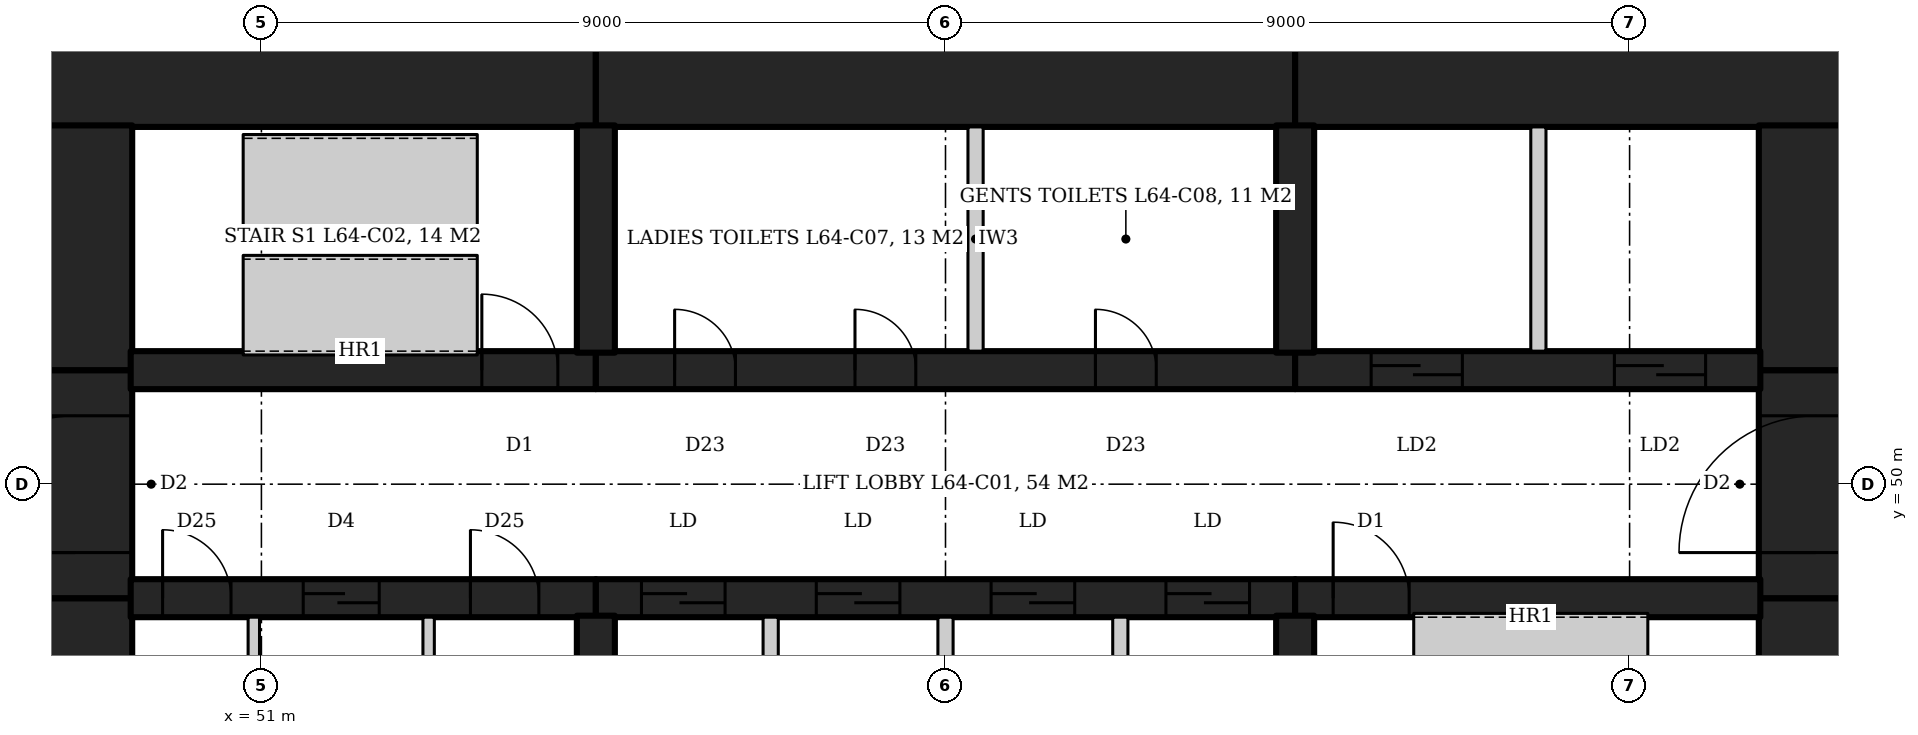
"""IFC4 building model, lengths in metres.
Left out: names, types, materials, properties, quantities, classifications, styles, units other than length and angle.
Written with IfcOpenShell. Run it as: python <this file> out.ifc"""

import sys

from ifc_helpers import new_model, si_unit, direction, frame, frame_2d, origin, place, context, subcontext, project, spatial, rectangle, extrude, element, fill, save


model = new_model("IFC4")
c1 = context("Model", 3, precision=1e-05, world=origin(), true_north=direction((0.0, 1.0)))
c2 = subcontext(c1, "Body", "Model", "MODEL_VIEW")
j1 = project(units=[si_unit("LENGTHUNIT", "METRE"), si_unit("PLANEANGLEUNIT", "RADIAN")], contexts=[c1])
p1 = place(None, origin())
s1 = spatial("IfcSite", under=j1, at=p1, CompositionType="ELEMENT")
p2 = place(p1, origin())
s2 = spatial("IfcBuilding", under=s1, at=p2, CompositionType="ELEMENT")
p3 = place(p2, frame((0.0, 0.0, 278.0)))
s3 = spatial("IfcBuildingStorey", under=s2, at=p3, CompositionType="ELEMENT", Elevation=278.0)
p4 = place(p3, frame((47.8, 55.45, 0.0), z_axis=(0.0, 0.0, 1.0), x_axis=(1.0, 0.0, 0.0)))
e1 = element("IfcWall", 1, at=p4, inside=s3, PredefinedType="SHEAR", context=c2, shape_type="SweptSolid", body=[
    extrude(rectangle(XDim=7.6, YDim=1.5, at=frame_2d((3.8, 0.0))), origin(), (0.0, 0.0, 1.0), 4.2),
])
p5 = place(p3, frame((55.4, 55.45, 0.0), z_axis=(0.0, 0.0, 1.0), x_axis=(1.0, 0.0, 0.0)))
e2 = element("IfcWall", 2, at=p5, inside=s3, PredefinedType="SHEAR", context=c2, shape_type="SweptSolid", body=[
    extrude(rectangle(XDim=9.2, YDim=1.5, at=frame_2d((4.6, 0.0))), origin(), (0.0, 0.0, 1.0), 4.2),
])
p6 = place(p3, frame((64.6, 55.45, 0.0), z_axis=(0.0, 0.0, 1.0), x_axis=(1.0, 0.0, 0.0)))
e3 = element("IfcWall", 3, at=p6, inside=s3, PredefinedType="SHEAR", context=c2, shape_type="SweptSolid", body=[
    extrude(rectangle(XDim=7.6, YDim=1.5, at=frame_2d((3.8, 0.0))), origin(), (0.0, 0.0, 1.0), 4.2),
])
p7 = place(p3, frame((71.45, 45.28, 0.0), z_axis=(0.0, 0.0, 1.0), x_axis=(0.0, 1.0, 0.0)))
e4 = element("IfcWall", 4, at=p7, inside=s3, PredefinedType="SHEAR", context=c2, shape_type="SweptSolid", body=[
    extrude(rectangle(XDim=3.22, YDim=1.5, at=frame_2d((1.61, 0.0))), origin(), (0.0, 0.0, 1.0), 4.2),
])
p8 = place(p3, frame((71.45, 48.5, 0.0), z_axis=(0.0, 0.0, 1.0), x_axis=(0.0, 1.0, 0.0)))
e5 = element("IfcWall", 5, at=p8, inside=s3, PredefinedType="SHEAR", context=c2, shape_type="SweptSolid", body=[
    extrude(rectangle(XDim=3.0, YDim=1.5, at=frame_2d((1.5, 0.0))), origin(), (0.0, 0.0, 1.0), 4.2),
])
p9 = place(p8, frame((0.6, 0.0, 0.0)))
e6 = element("IfcOpeningElement", 6, at=p9, cuts=e5, PredefinedType="OPENING", context=c2, shape_type="SweptSolid", body=[
    extrude(rectangle(XDim=1.8, YDim=2.1, at=frame_2d((0.9, 1.05))), frame((0.0, 0.76, 0.0), z_axis=(0.0, -1.0, 0.0), x_axis=(1.0, 0.0, 0.0)), (0.0, 0.0, 1.0), 1.52),
])
for number, where, z_axis, x_axis in (
    (7, (71.45, 51.5, 0.0), (0.0, 0.0, 1.0), (0.0, 1.0, 0.0)),
    (8, (48.55, 45.28, 0.0), (0.0, 0.0, 1.0), (0.0, 1.0, 0.0)),
):
    element("IfcWall", number, at=place(p3, frame(where, z_axis=z_axis, x_axis=x_axis)), inside=s3, PredefinedType="SHEAR", context=c2, shape_type="SweptSolid", body=[
        extrude(rectangle(XDim=3.22, YDim=1.5, at=frame_2d((1.61, 0.0))), origin(), (0.0, 0.0, 1.0), 4.2),
    ])
p10 = place(p3, frame((48.55, 48.5, 0.0), z_axis=(0.0, 0.0, 1.0), x_axis=(0.0, 1.0, 0.0)))
e9 = element("IfcWall", 9, at=p10, inside=s3, PredefinedType="SHEAR", context=c2, shape_type="SweptSolid", body=[
    extrude(rectangle(XDim=3.0, YDim=1.5, at=frame_2d((1.5, 0.0))), origin(), (0.0, 0.0, 1.0), 4.2),
])
p11 = place(p10, frame((0.6, 0.0, 0.0)))
e10 = element("IfcOpeningElement", 10, at=p11, cuts=e9, PredefinedType="OPENING", context=c2, shape_type="SweptSolid", body=[
    extrude(rectangle(XDim=1.8, YDim=2.1, at=frame_2d((0.9, 1.05))), frame((0.0, 0.76, 0.0), z_axis=(0.0, -1.0, 0.0), x_axis=(1.0, 0.0, 0.0)), (0.0, 0.0, 1.0), 1.52),
])
p12 = place(p3, frame((48.55, 51.5, 0.0), z_axis=(0.0, 0.0, 1.0), x_axis=(0.0, 1.0, 0.0)))
e11 = element("IfcWall", 11, at=p12, inside=s3, PredefinedType="SHEAR", context=c2, shape_type="SweptSolid", body=[
    extrude(rectangle(XDim=3.22, YDim=1.5, at=frame_2d((1.61, 0.0))), origin(), (0.0, 0.0, 1.0), 4.2),
])
p13 = place(p3, frame((49.28, 51.5, 0.0), z_axis=(0.0, 0.0, 1.0), x_axis=(1.0, 0.0, 0.0)))
e12 = element("IfcWall", 12, at=p13, inside=s3, PredefinedType="SHEAR", context=c2, shape_type="SweptSolid", body=[
    extrude(rectangle(XDim=6.12, YDim=0.5, at=frame_2d((3.06, 0.0))), origin(), (0.0, 0.0, 1.0), 4.2),
])
p14 = place(p13, frame((4.62, 0.0, 0.0)))
e13 = element("IfcOpeningElement", 13, at=p14, cuts=e12, PredefinedType="OPENING", context=c2, shape_type="SweptSolid", body=[
    extrude(rectangle(XDim=1.0, YDim=2.1, at=frame_2d((0.5, 1.05))), frame((0.0, 0.26, 0.0), z_axis=(0.0, -1.0, 0.0), x_axis=(1.0, 0.0, 0.0)), (0.0, 0.0, 1.0), 0.52),
])
p15 = place(p3, frame((55.4, 51.5, 0.0), z_axis=(0.0, 0.0, 1.0), x_axis=(1.0, 0.0, 0.0)))
e14 = element("IfcWall", 14, at=p15, inside=s3, PredefinedType="SHEAR", context=c2, shape_type="SweptSolid", body=[
    extrude(rectangle(XDim=9.2, YDim=0.5, at=frame_2d((4.6, 0.0))), origin(), (0.0, 0.0, 1.0), 4.2),
])
p16 = place(p15, frame((1.036, 0.0, 0.0)))
e15 = element("IfcOpeningElement", 15, at=p16, cuts=e14, PredefinedType="OPENING", context=c2, shape_type="SweptSolid", body=[
    extrude(rectangle(XDim=0.8, YDim=2.1, at=frame_2d((0.4, 1.05))), frame((0.0, 0.26, 0.0), z_axis=(0.0, -1.0, 0.0), x_axis=(1.0, 0.0, 0.0)), (0.0, 0.0, 1.0), 0.52),
])
p17 = place(p15, frame((3.409, 0.0, 0.0)))
e16 = element("IfcOpeningElement", 16, at=p17, cuts=e14, PredefinedType="OPENING", context=c2, shape_type="SweptSolid", body=[
    extrude(rectangle(XDim=0.8, YDim=2.1, at=frame_2d((0.4, 1.05))), frame((0.0, 0.26, 0.0), z_axis=(0.0, -1.0, 0.0), x_axis=(1.0, 0.0, 0.0)), (0.0, 0.0, 1.0), 0.52),
])
p18 = place(p15, frame((6.573, 0.0, 0.0)))
e17 = element("IfcOpeningElement", 17, at=p18, cuts=e14, PredefinedType="OPENING", context=c2, shape_type="SweptSolid", body=[
    extrude(rectangle(XDim=0.8, YDim=2.1, at=frame_2d((0.4, 1.05))), frame((0.0, 0.26, 0.0), z_axis=(0.0, -1.0, 0.0), x_axis=(1.0, 0.0, 0.0)), (0.0, 0.0, 1.0), 0.52),
])
p19 = place(p3, frame((64.6, 51.5, 0.0), z_axis=(0.0, 0.0, 1.0), x_axis=(1.0, 0.0, 0.0)))
e18 = element("IfcWall", 18, at=p19, inside=s3, PredefinedType="SHEAR", context=c2, shape_type="SweptSolid", body=[
    extrude(rectangle(XDim=6.12, YDim=0.5, at=frame_2d((3.06, 0.0))), origin(), (0.0, 0.0, 1.0), 4.2),
])
p20 = place(p19, frame((1.0, 0.0, 0.0)))
e19 = element("IfcOpeningElement", 19, at=p20, cuts=e18, PredefinedType="OPENING", context=c2, shape_type="SweptSolid", body=[
    extrude(rectangle(XDim=1.2, YDim=2.1, at=frame_2d((0.6, 1.05))), frame((0.0, 0.26, 0.0), z_axis=(0.0, -1.0, 0.0), x_axis=(1.0, 0.0, 0.0)), (0.0, 0.0, 1.0), 0.52),
])
p21 = place(p19, frame((4.2, 0.0, 0.0)))
e20 = element("IfcOpeningElement", 20, at=p21, cuts=e18, PredefinedType="OPENING", context=c2, shape_type="SweptSolid", body=[
    extrude(rectangle(XDim=1.2, YDim=2.1, at=frame_2d((0.6, 1.05))), frame((0.0, 0.26, 0.0), z_axis=(0.0, -1.0, 0.0), x_axis=(1.0, 0.0, 0.0)), (0.0, 0.0, 1.0), 0.52),
])
p22 = place(p3, frame((49.28, 48.5, 0.0), z_axis=(0.0, 0.0, 1.0), x_axis=(1.0, 0.0, 0.0)))
e21 = element("IfcWall", 21, at=p22, inside=s3, PredefinedType="SHEAR", context=c2, shape_type="SweptSolid", body=[
    extrude(rectangle(XDim=6.12, YDim=0.5, at=frame_2d((3.06, 0.0))), origin(), (0.0, 0.0, 1.0), 4.2),
])
p23 = place(p22, frame((0.42, 0.0, 0.0)))
e22 = element("IfcOpeningElement", 22, at=p23, cuts=e21, PredefinedType="OPENING", context=c2, shape_type="SweptSolid", body=[
    extrude(rectangle(XDim=0.9, YDim=2.1, at=frame_2d((0.45, 1.05))), frame((0.0, 0.26, 0.0), z_axis=(0.0, -1.0, 0.0), x_axis=(1.0, 0.0, 0.0)), (0.0, 0.0, 1.0), 0.52),
])
p24 = place(p22, frame((2.27, 0.0, 0.0)))
e23 = element("IfcOpeningElement", 23, at=p24, cuts=e21, PredefinedType="OPENING", context=c2, shape_type="SweptSolid", body=[
    extrude(rectangle(XDim=1.0, YDim=2.1, at=frame_2d((0.5, 1.05))), frame((0.0, 0.26, 0.0), z_axis=(0.0, -1.0, 0.0), x_axis=(1.0, 0.0, 0.0)), (0.0, 0.0, 1.0), 0.52),
])
p25 = place(p22, frame((4.47, 0.0, 0.0)))
e24 = element("IfcOpeningElement", 24, at=p25, cuts=e21, PredefinedType="OPENING", context=c2, shape_type="SweptSolid", body=[
    extrude(rectangle(XDim=0.9, YDim=2.1, at=frame_2d((0.45, 1.05))), frame((0.0, 0.26, 0.0), z_axis=(0.0, -1.0, 0.0), x_axis=(1.0, 0.0, 0.0)), (0.0, 0.0, 1.0), 0.52),
])
p26 = place(p3, frame((55.4, 48.5, 0.0), z_axis=(0.0, 0.0, 1.0), x_axis=(1.0, 0.0, 0.0)))
e25 = element("IfcWall", 25, at=p26, inside=s3, PredefinedType="SHEAR", context=c2, shape_type="SweptSolid", body=[
    extrude(rectangle(XDim=9.2, YDim=0.5, at=frame_2d((4.6, 0.0))), origin(), (0.0, 0.0, 1.0), 4.2),
])
p27 = place(p26, frame((0.6, 0.0, 0.0)))
e26 = element("IfcOpeningElement", 26, at=p27, cuts=e25, PredefinedType="OPENING", context=c2, shape_type="SweptSolid", body=[
    extrude(rectangle(XDim=1.1, YDim=2.1, at=frame_2d((0.55, 1.05))), frame((0.0, 0.26, 0.0), z_axis=(0.0, -1.0, 0.0), x_axis=(1.0, 0.0, 0.0)), (0.0, 0.0, 1.0), 0.52),
])
p28 = place(p26, frame((2.9, 0.0, 0.0)))
e27 = element("IfcOpeningElement", 27, at=p28, cuts=e25, PredefinedType="OPENING", context=c2, shape_type="SweptSolid", body=[
    extrude(rectangle(XDim=1.1, YDim=2.1, at=frame_2d((0.55, 1.05))), frame((0.0, 0.26, 0.0), z_axis=(0.0, -1.0, 0.0), x_axis=(1.0, 0.0, 0.0)), (0.0, 0.0, 1.0), 0.52),
])
p29 = place(p26, frame((5.2, 0.0, 0.0)))
e28 = element("IfcOpeningElement", 28, at=p29, cuts=e25, PredefinedType="OPENING", context=c2, shape_type="SweptSolid", body=[
    extrude(rectangle(XDim=1.1, YDim=2.1, at=frame_2d((0.55, 1.05))), frame((0.0, 0.26, 0.0), z_axis=(0.0, -1.0, 0.0), x_axis=(1.0, 0.0, 0.0)), (0.0, 0.0, 1.0), 0.52),
])
p30 = place(p26, frame((7.5, 0.0, 0.0)))
e29 = element("IfcOpeningElement", 29, at=p30, cuts=e25, PredefinedType="OPENING", context=c2, shape_type="SweptSolid", body=[
    extrude(rectangle(XDim=1.1, YDim=2.1, at=frame_2d((0.55, 1.05))), frame((0.0, 0.26, 0.0), z_axis=(0.0, -1.0, 0.0), x_axis=(1.0, 0.0, 0.0)), (0.0, 0.0, 1.0), 0.52),
])
p31 = place(p3, frame((64.6, 48.5, 0.0), z_axis=(0.0, 0.0, 1.0), x_axis=(1.0, 0.0, 0.0)))
e30 = element("IfcWall", 30, at=p31, inside=s3, PredefinedType="SHEAR", context=c2, shape_type="SweptSolid", body=[
    extrude(rectangle(XDim=6.12, YDim=0.5, at=frame_2d((3.06, 0.0))), origin(), (0.0, 0.0, 1.0), 4.2),
])
p32 = place(p31, frame((0.5, 0.0, 0.0)))
e31 = element("IfcOpeningElement", 31, at=p32, cuts=e30, PredefinedType="OPENING", context=c2, shape_type="SweptSolid", body=[
    extrude(rectangle(XDim=1.0, YDim=2.1, at=frame_2d((0.5, 1.05))), frame((0.0, 0.26, 0.0), z_axis=(0.0, -1.0, 0.0), x_axis=(1.0, 0.0, 0.0)), (0.0, 0.0, 1.0), 0.52),
])
for number, where, z_axis, x_axis in (
    (32, (55.4, 51.73, 0.0), (0.0, 0.0, 1.0), (0.0, 1.0, 0.0)),
    (33, (64.6, 51.73, 0.0), (0.0, 0.0, 1.0), (0.0, 1.0, 0.0)),
    (34, (55.4, 48.27, 0.0), (0.0, 0.0, 1.0), (0.0, -1.0, 0.0)),
    (35, (64.6, 48.27, 0.0), (0.0, 0.0, 1.0), (0.0, -1.0, 0.0)),
):
    element("IfcWall", number, at=place(p3, frame(where, z_axis=z_axis, x_axis=x_axis)), inside=s3, PredefinedType="SHEAR", context=c2, shape_type="SweptSolid", body=[
        extrude(rectangle(XDim=2.99, YDim=0.5, at=frame_2d((1.495, 0.0))), origin(), (0.0, 0.0, 1.0), 4.2),
    ])
for number, where, z_axis, x_axis in (
    (36, (57.7, 45.3, 0.0), (0.0, 0.0, 1.0), (0.0, 1.0, 0.0)),
    (37, (60.0, 45.3, 0.0), (0.0, 0.0, 1.0), (0.0, 1.0, 0.0)),
    (38, (62.3, 45.3, 0.0), (0.0, 0.0, 1.0), (0.0, 1.0, 0.0)),
    (39, (67.8, 51.75, 0.0), (0.0, 0.0, 1.0), (0.0, 1.0, 0.0)),
):
    element("IfcWall", number, at=place(p3, frame(where, z_axis=z_axis, x_axis=x_axis)), inside=s3, PredefinedType="PARTITIONING", context=c2, shape_type="SweptSolid", body=[
        extrude(rectangle(XDim=2.95, YDim=0.2, at=frame_2d((1.475, 0.0))), origin(), (0.0, 0.0, 1.0), 4.2),
    ])
for number, where, z_axis, x_axis in (
    (40, (50.9, 45.3, 0.0), (0.0, 0.0, 1.0), (0.0, 1.0, 0.0)),
    (41, (53.2, 45.3, 0.0), (0.0, 0.0, 1.0), (0.0, 1.0, 0.0)),
):
    element("IfcWall", number, at=place(p3, frame(where, z_axis=z_axis, x_axis=x_axis)), inside=s3, PredefinedType="PARTITIONING", context=c2, shape_type="SweptSolid", body=[
        extrude(rectangle(XDim=2.95, YDim=0.15, at=frame_2d((1.475, 0.0))), origin(), (0.0, 0.0, 1.0), 4.04),
    ])
p33 = place(p3, frame((60.396, 51.75, 0.0), z_axis=(0.0, 0.0, 1.0), x_axis=(0.0, 1.0, 0.0)))
e42 = element("IfcWall", 42, at=p33, inside=s3, PredefinedType="PARTITIONING", context=c2, shape_type="SweptSolid", body=[
    extrude(rectangle(XDim=2.95, YDim=0.2, at=frame_2d((1.475, 0.0))), origin(), (0.0, 0.0, 1.0), 4.04),
])
p34 = place(p14, origin())
e43 = element("IfcDoor", 43, at=p34, inside=s3, OperationType="SINGLE_SWING_LEFT", PredefinedType="DOOR", context=c2, shape_type="SweptSolid", body=[
    extrude(rectangle(XDim=1.0, YDim=2.1, at=frame_2d((0.5, 1.05))), frame((0.0, 0.025, 0.0), z_axis=(0.0, -1.0, 0.0), x_axis=(1.0, 0.0, 0.0)), (0.0, 0.0, 1.0), 0.05),
])
fill(e13, e43)
p35 = place(p32, origin())
e44 = element("IfcDoor", 44, at=p35, inside=s3, OperationType="SINGLE_SWING_LEFT", PredefinedType="DOOR", context=c2, shape_type="SweptSolid", body=[
    extrude(rectangle(XDim=1.0, YDim=2.1, at=frame_2d((0.5, 1.05))), frame((0.0, 0.025, 0.0), z_axis=(0.0, -1.0, 0.0), x_axis=(1.0, 0.0, 0.0)), (0.0, 0.0, 1.0), 0.05),
])
fill(e31, e44)
p36 = place(p20, origin())
e45 = element("IfcDoor", 45, at=p36, inside=s3, OperationType="SLIDING_TO_LEFT", PredefinedType="DOOR", context=c2, shape_type="SweptSolid", body=[
    extrude(rectangle(XDim=1.2, YDim=2.1, at=frame_2d((0.6, 1.05))), frame((0.0, 0.025, 0.0), z_axis=(0.0, -1.0, 0.0), x_axis=(1.0, 0.0, 0.0)), (0.0, 0.0, 1.0), 0.05),
])
fill(e19, e45)
p37 = place(p21, origin())
e46 = element("IfcDoor", 46, at=p37, inside=s3, OperationType="SLIDING_TO_LEFT", PredefinedType="DOOR", context=c2, shape_type="SweptSolid", body=[
    extrude(rectangle(XDim=1.2, YDim=2.1, at=frame_2d((0.6, 1.05))), frame((0.0, 0.025, 0.0), z_axis=(0.0, -1.0, 0.0), x_axis=(1.0, 0.0, 0.0)), (0.0, 0.0, 1.0), 0.05),
])
fill(e20, e46)
p38 = place(p27, origin())
e47 = element("IfcDoor", 47, at=p38, inside=s3, OperationType="SLIDING_TO_LEFT", PredefinedType="DOOR", context=c2, shape_type="SweptSolid", body=[
    extrude(rectangle(XDim=1.1, YDim=2.1, at=frame_2d((0.55, 1.05))), frame((0.0, 0.025, 0.0), z_axis=(0.0, -1.0, 0.0), x_axis=(1.0, 0.0, 0.0)), (0.0, 0.0, 1.0), 0.05),
])
fill(e26, e47)
p39 = place(p28, origin())
e48 = element("IfcDoor", 48, at=p39, inside=s3, OperationType="SLIDING_TO_LEFT", PredefinedType="DOOR", context=c2, shape_type="SweptSolid", body=[
    extrude(rectangle(XDim=1.1, YDim=2.1, at=frame_2d((0.55, 1.05))), frame((0.0, 0.025, 0.0), z_axis=(0.0, -1.0, 0.0), x_axis=(1.0, 0.0, 0.0)), (0.0, 0.0, 1.0), 0.05),
])
fill(e27, e48)
p40 = place(p29, origin())
e49 = element("IfcDoor", 49, at=p40, inside=s3, OperationType="SLIDING_TO_LEFT", PredefinedType="DOOR", context=c2, shape_type="SweptSolid", body=[
    extrude(rectangle(XDim=1.1, YDim=2.1, at=frame_2d((0.55, 1.05))), frame((0.0, 0.025, 0.0), z_axis=(0.0, -1.0, 0.0), x_axis=(1.0, 0.0, 0.0)), (0.0, 0.0, 1.0), 0.05),
])
fill(e28, e49)
p41 = place(p30, origin())
e50 = element("IfcDoor", 50, at=p41, inside=s3, OperationType="SLIDING_TO_LEFT", PredefinedType="DOOR", context=c2, shape_type="SweptSolid", body=[
    extrude(rectangle(XDim=1.1, YDim=2.1, at=frame_2d((0.55, 1.05))), frame((0.0, 0.025, 0.0), z_axis=(0.0, -1.0, 0.0), x_axis=(1.0, 0.0, 0.0)), (0.0, 0.0, 1.0), 0.05),
])
fill(e29, e50)
p42 = place(p23, origin())
e51 = element("IfcDoor", 51, at=p42, inside=s3, OperationType="SINGLE_SWING_RIGHT", PredefinedType="DOOR", context=c2, shape_type="SweptSolid", body=[
    extrude(rectangle(XDim=0.9, YDim=2.1, at=frame_2d((0.45, 1.05))), frame((0.0, 0.025, 0.0), z_axis=(0.0, -1.0, 0.0), x_axis=(1.0, 0.0, 0.0)), (0.0, 0.0, 1.0), 0.05),
])
fill(e22, e51)
p43 = place(p24, origin())
e52 = element("IfcDoor", 52, at=p43, inside=s3, OperationType="SLIDING_TO_LEFT", PredefinedType="DOOR", context=c2, shape_type="SweptSolid", body=[
    extrude(rectangle(XDim=1.0, YDim=2.1, at=frame_2d((0.5, 1.05))), frame((0.0, 0.025, 0.0), z_axis=(0.0, -1.0, 0.0), x_axis=(1.0, 0.0, 0.0)), (0.0, 0.0, 1.0), 0.05),
])
fill(e23, e52)
p44 = place(p25, origin())
e53 = element("IfcDoor", 53, at=p44, inside=s3, OperationType="SINGLE_SWING_RIGHT", PredefinedType="DOOR", context=c2, shape_type="SweptSolid", body=[
    extrude(rectangle(XDim=0.9, YDim=2.1, at=frame_2d((0.45, 1.05))), frame((0.0, 0.025, 0.0), z_axis=(0.0, -1.0, 0.0), x_axis=(1.0, 0.0, 0.0)), (0.0, 0.0, 1.0), 0.05),
])
fill(e24, e53)
p45 = place(p9, origin())
e54 = element("IfcDoor", 54, at=p45, inside=s3, OperationType="DOUBLE_DOOR_DOUBLE_SWING", PredefinedType="DOOR", context=c2, shape_type="SweptSolid", body=[
    extrude(rectangle(XDim=1.8, YDim=2.1, at=frame_2d((0.9, 1.05))), frame((0.0, 0.025, 0.0), z_axis=(0.0, -1.0, 0.0), x_axis=(1.0, 0.0, 0.0)), (0.0, 0.0, 1.0), 0.05),
])
fill(e6, e54)
p46 = place(p11, origin())
e55 = element("IfcDoor", 55, at=p46, inside=s3, OperationType="DOUBLE_DOOR_DOUBLE_SWING", PredefinedType="DOOR", context=c2, shape_type="SweptSolid", body=[
    extrude(rectangle(XDim=1.8, YDim=2.1, at=frame_2d((0.9, 1.05))), frame((0.0, 0.025, 0.0), z_axis=(0.0, -1.0, 0.0), x_axis=(1.0, 0.0, 0.0)), (0.0, 0.0, 1.0), 0.05),
])
fill(e10, e55)
p47 = place(p16, origin())
e56 = element("IfcDoor", 56, at=p47, inside=s3, OperationType="SINGLE_SWING_LEFT", PredefinedType="DOOR", context=c2, shape_type="SweptSolid", body=[
    extrude(rectangle(XDim=0.8, YDim=2.1, at=frame_2d((0.4, 1.05))), frame((0.0, 0.025, 0.0), z_axis=(0.0, -1.0, 0.0), x_axis=(1.0, 0.0, 0.0)), (0.0, 0.0, 1.0), 0.05),
])
fill(e15, e56)
p48 = place(p17, origin())
e57 = element("IfcDoor", 57, at=p48, inside=s3, OperationType="SINGLE_SWING_LEFT", PredefinedType="DOOR", context=c2, shape_type="SweptSolid", body=[
    extrude(rectangle(XDim=0.8, YDim=2.1, at=frame_2d((0.4, 1.05))), frame((0.0, 0.025, 0.0), z_axis=(0.0, -1.0, 0.0), x_axis=(1.0, 0.0, 0.0)), (0.0, 0.0, 1.0), 0.05),
])
fill(e16, e57)
p49 = place(p18, origin())
e58 = element("IfcDoor", 58, at=p49, inside=s3, OperationType="SINGLE_SWING_LEFT", PredefinedType="DOOR", context=c2, shape_type="SweptSolid", body=[
    extrude(rectangle(XDim=0.8, YDim=2.1, at=frame_2d((0.4, 1.05))), frame((0.0, 0.025, 0.0), z_axis=(0.0, -1.0, 0.0), x_axis=(1.0, 0.0, 0.0)), (0.0, 0.0, 1.0), 0.05),
])
fill(e17, e58)
save(model, sys.argv[1])
